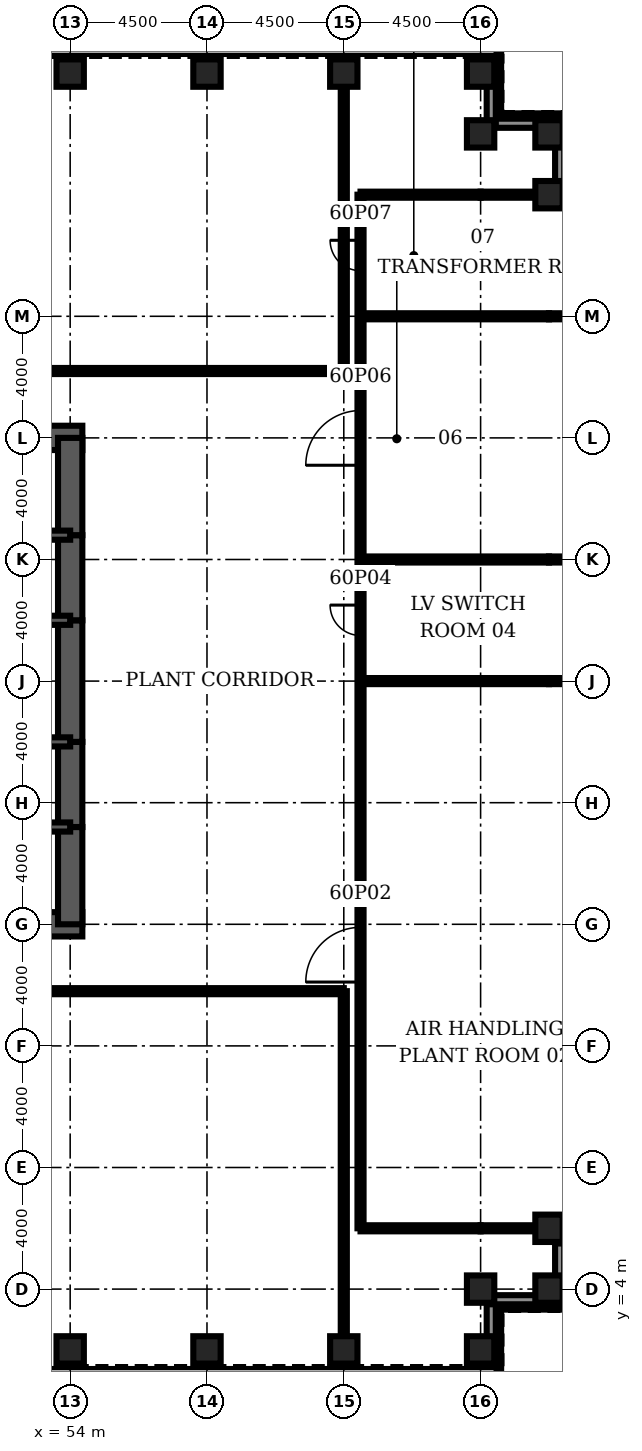
"""IFC4 building model, lengths in metres.
Left out: names, types, materials, properties, quantities, classifications, styles, units other than length and angle.
Written with IfcOpenShell. Run it as: python <this file> out.ifc"""

import sys

from ifc_helpers import new_model, si_unit, direction, frame, frame_2d, origin, origin_2d, place, context, subcontext, project, spatial, rectangle, hollow_rectangle, extrude, element, fill, save


model = new_model("IFC4")
c1 = context("Model", 3, precision=1e-05, world=origin(), true_north=direction((0.0, 1.0)))
c2 = subcontext(c1, "Body", "Model", "MODEL_VIEW")
j1 = project(units=[si_unit("LENGTHUNIT", "METRE"), si_unit("PLANEANGLEUNIT", "RADIAN")], contexts=[c1])
p1 = place(None, origin())
s1 = spatial("IfcSite", under=j1, at=p1, CompositionType="ELEMENT")
p2 = place(p1, origin())
s2 = spatial("IfcBuilding", under=s1, at=p2, CompositionType="ELEMENT")
p3 = place(p2, frame((0.0, 0.0, 265.6)))
s3 = spatial("IfcBuildingStorey", under=s2, at=p3, CompositionType="ELEMENT", Elevation=265.6)
for number, where, z_axis, x_axis in (
    (1, (54.0, 2.0, 0.0), (0.0, 0.0, 1.0), (0.0, 1.0, 0.0)),
    (2, (58.5, 2.0, 0.0), (0.0, 0.0, 1.0), (0.0, 1.0, 0.0)),
    (3, (63.0, 2.0, 0.0), (0.0, 0.0, 1.0), (0.0, 1.0, 0.0)),
):
    element("IfcColumn", number, at=place(p3, frame(where, z_axis=z_axis, x_axis=x_axis)), inside=s3, PredefinedType="COLUMN", context=c2, shape_type="SweptSolid", body=[
        extrude(hollow_rectangle(XDim=0.9, YDim=0.9, WallThickness=0.07, at=origin_2d()), origin(), (0.0, 0.0, 1.0), 5.5),
    ])
for number, where, z_axis, x_axis in (
    (4, (67.43, 2.0, 0.172), (-0.379, 0.0, 0.926), (0.0, -1.0, 0.0)),
    (5, (67.43, 4.0, 0.172), (-0.379, 0.0, 0.926), (0.0, -1.0, 0.0)),
    (6, (69.68, 4.0, 0.172), (-0.379, 0.0, 0.926), (0.926, 0.0, 0.379)),
    (7, (69.68, 6.0, 0.172), (-0.379, 0.0, 0.926), (0.926, 0.0, 0.379)),
    (8, (71.93, 6.0, 0.172), (-0.379, 0.0, 0.926), (0.926, 0.0, 0.379)),
    (9, (71.93, 8.0, 0.172), (-0.379, 0.0, 0.926), (0.926, 0.0, 0.379)),
    (10, (71.93, 12.0, 0.172), (-0.379, 0.0, 0.926), (0.926, 0.0, 0.379)),
    (11, (71.93, 16.0, 0.172), (-0.379, 0.0, 0.926), (0.926, 0.0, 0.379)),
    (12, (71.93, 20.0, 0.172), (-0.379, 0.0, 0.926), (0.926, 0.0, 0.379)),
    (13, (71.93, 24.0, 0.172), (-0.379, 0.0, 0.926), (0.926, 0.0, 0.379)),
    (14, (71.93, 28.0, 0.172), (-0.379, 0.0, 0.926), (0.926, 0.0, 0.379)),
    (15, (71.93, 32.0, 0.172), (-0.379, 0.0, 0.926), (0.926, 0.0, 0.379)),
    (16, (71.93, 36.0, 0.172), (-0.379, 0.0, 0.926), (0.926, 0.0, 0.379)),
    (17, (71.93, 40.0, 0.172), (-0.379, 0.0, 0.926), (0.926, 0.0, 0.379)),
    (18, (69.68, 40.0, 0.172), (-0.379, 0.0, 0.926), (0.926, 0.0, 0.379)),
    (19, (69.68, 42.0, 0.172), (-0.379, 0.0, 0.926), (0.926, 0.0, 0.379)),
    (20, (67.43, 42.0, 0.172), (-0.379, 0.0, 0.926), (0.0, -1.0, 0.0)),
    (21, (67.43, 44.0, 0.172), (-0.379, 0.0, 0.926), (0.0, -1.0, 0.0)),
):
    element("IfcColumn", number, at=place(p3, frame(where, z_axis=z_axis, x_axis=x_axis)), inside=s3, PredefinedType="USERDEFINED", context=c2, shape_type="SweptSolid", body=[
        extrude(hollow_rectangle(XDim=0.9, YDim=0.9, WallThickness=0.07, at=origin_2d()), origin(), (0.0, 0.0, 1.0), 5.57),
    ])
for number, where, z_axis, x_axis in (
    (22, (63.0, 44.0, 0.0), (0.0, 0.0, 1.0), (0.0, 1.0, 0.0)),
    (23, (58.5, 44.0, 0.0), (0.0, 0.0, 1.0), (0.0, 1.0, 0.0)),
    (24, (54.0, 44.0, 0.0), (0.0, 0.0, 1.0), (0.0, 1.0, 0.0)),
):
    element("IfcColumn", number, at=place(p3, frame(where, z_axis=z_axis, x_axis=x_axis)), inside=s3, PredefinedType="COLUMN", context=c2, shape_type="SweptSolid", body=[
        extrude(hollow_rectangle(XDim=0.9, YDim=0.9, WallThickness=0.07, at=origin_2d()), origin(), (0.0, 0.0, 1.0), 5.5),
    ])
for number, where, z_axis, x_axis in (
    (25, (45.0, 16.0, 0.0), (0.0, 0.0, 1.0), (1.0, 0.0, 0.0)),
    (26, (54.4, 32.0, 0.0), (0.0, 0.0, 1.0), (-1.0, 0.0, 0.0)),
):
    element("IfcWall", number, at=place(p3, frame(where, z_axis=z_axis, x_axis=x_axis)), inside=s3, PredefinedType="SHEAR", context=c2, shape_type="SweptSolid", body=[
        extrude(rectangle(XDim=9.4, YDim=0.8, at=frame_2d((4.7, 0.0))), origin(), (0.0, 0.0, 1.0), 5.5),
    ])
p4 = place(p3, frame((54.0, 16.0, 0.0), z_axis=(0.0, 0.0, 1.0), x_axis=(0.0, 1.0, 0.0)))
e27 = element("IfcWall", 27, at=p4, inside=s3, PredefinedType="SHEAR", context=c2, shape_type="SweptSolid", body=[
    extrude(rectangle(XDim=3.2, YDim=0.8, at=frame_2d((1.6, 0.0))), origin(), (0.0, 0.0, 1.0), 5.5),
])
p5 = place(p3, frame((54.0, 19.2, 0.0), z_axis=(0.0, 0.0, 1.0), x_axis=(0.0, 1.0, 0.0)))
e28 = element("IfcWall", 28, at=p5, inside=s3, PredefinedType="SHEAR", context=c2, shape_type="SweptSolid", body=[
    extrude(rectangle(XDim=2.8, YDim=0.8, at=frame_2d((1.4, 0.0))), origin(), (0.0, 0.0, 1.0), 5.5),
])
p6 = place(p5, frame((0.4, 0.0, 0.0)))
e29 = element("IfcOpeningElement", 29, at=p6, cuts=e28, PredefinedType="OPENING", context=c2, shape_type="SweptSolid", body=[
    extrude(rectangle(XDim=1.8, YDim=2.1, at=frame_2d((0.9, 1.05))), frame((0.0, 0.41, 0.0), z_axis=(0.0, -1.0, 0.0), x_axis=(1.0, 0.0, 0.0)), (0.0, 0.0, 1.0), 0.82),
])
p7 = place(p3, frame((54.0, 22.0, 0.0), z_axis=(0.0, 0.0, 1.0), x_axis=(0.0, 1.0, 0.0)))
e30 = element("IfcWall", 30, at=p7, inside=s3, PredefinedType="SHEAR", context=c2, shape_type="SweptSolid", body=[
    extrude(rectangle(XDim=4.0, YDim=0.8, at=frame_2d((2.0, 0.0))), origin(), (0.0, 0.0, 1.0), 5.5),
])
p8 = place(p3, frame((54.0, 26.0, 0.0), z_axis=(0.0, 0.0, 1.0), x_axis=(0.0, 1.0, 0.0)))
e31 = element("IfcWall", 31, at=p8, inside=s3, PredefinedType="SHEAR", context=c2, shape_type="SweptSolid", body=[
    extrude(rectangle(XDim=2.8, YDim=0.8, at=frame_2d((1.4, 0.0))), origin(), (0.0, 0.0, 1.0), 5.5),
])
p9 = place(p8, frame((0.6, 0.0, 0.0)))
e32 = element("IfcOpeningElement", 32, at=p9, cuts=e31, PredefinedType="OPENING", context=c2, shape_type="SweptSolid", body=[
    extrude(rectangle(XDim=1.8, YDim=2.1, at=frame_2d((0.9, 1.05))), frame((0.0, 0.41, 0.0), z_axis=(0.0, -1.0, 0.0), x_axis=(1.0, 0.0, 0.0)), (0.0, 0.0, 1.0), 0.82),
])
p10 = place(p3, frame((54.0, 28.8, 0.0), z_axis=(0.0, 0.0, 1.0), x_axis=(0.0, 1.0, 0.0)))
e33 = element("IfcWall", 33, at=p10, inside=s3, PredefinedType="SHEAR", context=c2, shape_type="SweptSolid", body=[
    extrude(rectangle(XDim=3.2, YDim=0.8, at=frame_2d((1.6, 0.0))), origin(), (0.0, 0.0, 1.0), 5.5),
])
p11 = place(p3, frame((45.0, 19.2, 0.0), z_axis=(0.0, 0.0, 1.0), x_axis=(1.0, 0.0, 0.0)))
e34 = element("IfcWall", 34, at=p11, inside=s3, PredefinedType="SOLIDWALL", context=c2, shape_type="SweptSolid", body=[
    extrude(rectangle(XDim=9.0, YDim=0.3, at=frame_2d((4.5, 0.0))), origin(), (0.0, 0.0, 1.0), 5.5),
])
p12 = place(p11, frame((7.35, 0.0, 0.0)))
e35 = element("IfcOpeningElement", 35, at=p12, cuts=e34, PredefinedType="OPENING", context=c2, shape_type="SweptSolid", body=[
    extrude(rectangle(XDim=1.0, YDim=2.1, at=frame_2d((0.5, 1.05))), frame((0.0, 0.16, 0.0), z_axis=(0.0, -1.0, 0.0), x_axis=(1.0, 0.0, 0.0)), (0.0, 0.0, 1.0), 0.32),
])
p13 = place(p3, frame((45.0, 28.8, 0.0), z_axis=(0.0, 0.0, 1.0), x_axis=(1.0, 0.0, 0.0)))
e36 = element("IfcWall", 36, at=p13, inside=s3, PredefinedType="SOLIDWALL", context=c2, shape_type="SweptSolid", body=[
    extrude(rectangle(XDim=9.0, YDim=0.3, at=frame_2d((4.5, 0.0))), origin(), (0.0, 0.0, 1.0), 5.5),
])
p14 = place(p13, frame((7.35, 0.0, 0.0)))
e37 = element("IfcOpeningElement", 37, at=p14, cuts=e36, PredefinedType="OPENING", context=c2, shape_type="SweptSolid", body=[
    extrude(rectangle(XDim=1.0, YDim=2.1, at=frame_2d((0.5, 1.05))), frame((0.0, 0.16, 0.0), z_axis=(0.0, -1.0, 0.0), x_axis=(1.0, 0.0, 0.0)), (0.0, 0.0, 1.0), 0.32),
])
p15 = place(p3, frame((48.0, 22.0, 0.0), z_axis=(0.0, 0.0, 1.0), x_axis=(1.0, 0.0, 0.0)))
e38 = element("IfcWall", 38, at=p15, inside=s3, PredefinedType="SOLIDWALL", context=c2, shape_type="SweptSolid", body=[
    extrude(rectangle(XDim=6.0, YDim=0.3, at=frame_2d((3.0, 0.0))), origin(), (0.0, 0.0, 1.0), 5.5),
])
p16 = place(p15, frame((2.0, 0.0, 0.0)))
e39 = element("IfcOpeningElement", 39, at=p16, cuts=e38, PredefinedType="OPENING", context=c2, shape_type="SweptSolid", body=[
    extrude(rectangle(XDim=1.0, YDim=2.1, at=frame_2d((0.5, 1.05))), frame((0.0, 0.16, 0.0), z_axis=(0.0, -1.0, 0.0), x_axis=(1.0, 0.0, 0.0)), (0.0, 0.0, 1.0), 0.32),
])
p17 = place(p3, frame((48.0, 26.0, 0.0), z_axis=(0.0, 0.0, 1.0), x_axis=(1.0, 0.0, 0.0)))
e40 = element("IfcWall", 40, at=p17, inside=s3, PredefinedType="SOLIDWALL", context=c2, shape_type="SweptSolid", body=[
    extrude(rectangle(XDim=6.0, YDim=0.3, at=frame_2d((3.0, 0.0))), origin(), (0.0, 0.0, 1.0), 5.5),
])
p18 = place(p3, frame((63.55, 6.0, 0.0), z_axis=(0.0, 0.0, 1.0), x_axis=(1.0, 0.0, 0.0)))
e41 = element("IfcWall", 41, at=p18, inside=s3, PredefinedType="PARTITIONING", context=c2, shape_type="SweptSolid", body=[
    extrude(rectangle(XDim=3.95, YDim=0.2, at=frame_2d((1.975, 0.0))), origin(), (0.0, 0.0, 1.0), 5.34),
])
p19 = place(p3, frame((67.5, 6.0, 0.0), z_axis=(0.0, 0.0, 1.0), x_axis=(1.0, 0.0, 0.0)))
e42 = element("IfcWall", 42, at=p19, inside=s3, PredefinedType="PARTITIONING", context=c2, shape_type="SweptSolid", body=[
    extrude(rectangle(XDim=1.8, YDim=0.2, at=frame_2d((0.9, 0.0))), origin(), (0.0, 0.0, 1.0), 4.64),
])
p20 = place(p3, frame((9.0, 13.8, 0.0), z_axis=(0.0, 0.0, 1.0), x_axis=(1.0, 0.0, 0.0)))
e43 = element("IfcWall", 43, at=p20, inside=s3, PredefinedType="PARTITIONING", context=c2, shape_type="SweptSolid", body=[
    extrude(rectangle(XDim=54.0, YDim=0.2, at=frame_2d((27.0, 0.0))), origin(), (0.0, 0.0, 1.0), 5.34),
])
p21 = place(p20, frame((26.1, 0.0, 0.0)))
e44 = element("IfcOpeningElement", 44, at=p21, cuts=e43, PredefinedType="OPENING", context=c2, shape_type="SweptSolid", body=[
    extrude(rectangle(XDim=1.8, YDim=2.1, at=frame_2d((0.9, 1.05))), frame((0.0, 0.11, 0.0), z_axis=(0.0, -1.0, 0.0), x_axis=(1.0, 0.0, 0.0)), (0.0, 0.0, 1.0), 0.22),
])
p22 = place(p3, frame((63.55, 24.0, 0.0), z_axis=(0.0, 0.0, 1.0), x_axis=(1.0, 0.0, 0.0)))
e45 = element("IfcWall", 45, at=p22, inside=s3, PredefinedType="PARTITIONING", context=c2, shape_type="SweptSolid", body=[
    extrude(rectangle(XDim=6.2, YDim=0.2, at=frame_2d((3.1, 0.0))), origin(), (0.0, 0.0, 1.0), 5.25),
])
p23 = place(p3, frame((69.75, 24.0, 0.0), z_axis=(0.0, 0.0, 1.0), x_axis=(1.0, 0.0, 0.0)))
e46 = element("IfcWall", 46, at=p23, inside=s3, PredefinedType="PARTITIONING", context=c2, shape_type="SweptSolid", body=[
    extrude(rectangle(XDim=1.8, YDim=0.2, at=frame_2d((0.9, 0.0))), origin(), (0.0, 0.0, 1.0), 4.726),
])
p24 = place(p3, frame((63.55, 28.0, 0.0), z_axis=(0.0, 0.0, 1.0), x_axis=(1.0, 0.0, 0.0)))
e47 = element("IfcWall", 47, at=p24, inside=s3, PredefinedType="PARTITIONING", context=c2, shape_type="SweptSolid", body=[
    extrude(rectangle(XDim=6.2, YDim=0.2, at=frame_2d((3.1, 0.0))), origin(), (0.0, 0.0, 1.0), 5.25),
])
p25 = place(p3, frame((69.75, 28.0, 0.0), z_axis=(0.0, 0.0, 1.0), x_axis=(1.0, 0.0, 0.0)))
e48 = element("IfcWall", 48, at=p25, inside=s3, PredefinedType="PARTITIONING", context=c2, shape_type="SweptSolid", body=[
    extrude(rectangle(XDim=1.8, YDim=0.2, at=frame_2d((0.9, 0.0))), origin(), (0.0, 0.0, 1.0), 4.726),
])
p26 = place(p3, frame((9.0, 34.2, 0.0), z_axis=(0.0, 0.0, 1.0), x_axis=(1.0, 0.0, 0.0)))
e49 = element("IfcWall", 49, at=p26, inside=s3, PredefinedType="PARTITIONING", context=c2, shape_type="SweptSolid", body=[
    extrude(rectangle(XDim=54.0, YDim=0.2, at=frame_2d((27.0, 0.0))), origin(), (0.0, 0.0, 1.0), 5.34),
])
p27 = place(p26, frame((26.1, 0.0, 0.0)))
e50 = element("IfcOpeningElement", 50, at=p27, cuts=e49, PredefinedType="OPENING", context=c2, shape_type="SweptSolid", body=[
    extrude(rectangle(XDim=1.8, YDim=2.1, at=frame_2d((0.9, 1.05))), frame((0.0, 0.11, 0.0), z_axis=(0.0, -1.0, 0.0), x_axis=(1.0, 0.0, 0.0)), (0.0, 0.0, 1.0), 0.22),
])
p28 = place(p3, frame((63.55, 36.0, 0.0), z_axis=(0.0, 0.0, 1.0), x_axis=(1.0, 0.0, 0.0)))
e51 = element("IfcWall", 51, at=p28, inside=s3, PredefinedType="PARTITIONING", context=c2, shape_type="SweptSolid", body=[
    extrude(rectangle(XDim=6.2, YDim=0.2, at=frame_2d((3.1, 0.0))), origin(), (0.0, 0.0, 1.0), 5.25),
])
p29 = place(p3, frame((69.75, 36.0, 0.0), z_axis=(0.0, 0.0, 1.0), x_axis=(1.0, 0.0, 0.0)))
e52 = element("IfcWall", 52, at=p29, inside=s3, PredefinedType="PARTITIONING", context=c2, shape_type="SweptSolid", body=[
    extrude(rectangle(XDim=1.8, YDim=0.2, at=frame_2d((0.9, 0.0))), origin(), (0.0, 0.0, 1.0), 4.726),
])
p30 = place(p3, frame((63.55, 40.0, 0.0), z_axis=(0.0, 0.0, 1.0), x_axis=(1.0, 0.0, 0.0)))
e53 = element("IfcWall", 53, at=p30, inside=s3, PredefinedType="PARTITIONING", context=c2, shape_type="SweptSolid", body=[
    extrude(rectangle(XDim=3.95, YDim=0.2, at=frame_2d((1.975, 0.0))), origin(), (0.0, 0.0, 1.0), 5.34),
])
p31 = place(p3, frame((67.5, 40.0, 0.0), z_axis=(0.0, 0.0, 1.0), x_axis=(1.0, 0.0, 0.0)))
e54 = element("IfcWall", 54, at=p31, inside=s3, PredefinedType="PARTITIONING", context=c2, shape_type="SweptSolid", body=[
    extrude(rectangle(XDim=1.8, YDim=0.2, at=frame_2d((0.9, 0.0))), origin(), (0.0, 0.0, 1.0), 4.64),
])
p32 = place(p3, frame((63.0, 2.45, 0.0), z_axis=(0.0, 0.0, 1.0), x_axis=(0.0, 1.0, 0.0)))
e55 = element("IfcWall", 55, at=p32, inside=s3, PredefinedType="PARTITIONING", context=c2, shape_type="SweptSolid", body=[
    extrude(rectangle(XDim=11.35, YDim=0.2, at=frame_2d((5.675, 0.0))), origin(), (0.0, 0.0, 1.0), 5.34),
])
p33 = place(p3, frame((63.0, 34.2, 0.0), z_axis=(0.0, 0.0, 1.0), x_axis=(0.0, 1.0, 0.0)))
e56 = element("IfcWall", 56, at=p33, inside=s3, PredefinedType="PARTITIONING", context=c2, shape_type="SweptSolid", body=[
    extrude(rectangle(XDim=9.35, YDim=0.2, at=frame_2d((4.675, 0.0))), origin(), (0.0, 0.0, 1.0), 5.34),
])
p34 = place(p3, frame((63.55, 6.0, 0.0), z_axis=(0.0, 0.0, 1.0), x_axis=(0.0, 1.0, 0.0)))
e57 = element("IfcWall", 57, at=p34, inside=s3, PredefinedType="PARTITIONING", context=c2, shape_type="SweptSolid", body=[
    extrude(rectangle(XDim=34.0, YDim=0.2, at=frame_2d((17.0, 0.0))), origin(), (0.0, 0.0, 1.0), 5.34),
])
p35 = place(p34, frame((8.1, 0.0, 0.0)))
e58 = element("IfcOpeningElement", 58, at=p35, cuts=e57, PredefinedType="OPENING", context=c2, shape_type="SweptSolid", body=[
    extrude(rectangle(XDim=1.8, YDim=2.1, at=frame_2d((0.9, 1.05))), frame((0.0, 0.11, 0.0), z_axis=(0.0, -1.0, 0.0), x_axis=(1.0, 0.0, 0.0)), (0.0, 0.0, 1.0), 0.22),
])
p36 = place(p34, frame((19.5, 0.0, 0.0)))
e59 = element("IfcOpeningElement", 59, at=p36, cuts=e57, PredefinedType="OPENING", context=c2, shape_type="SweptSolid", body=[
    extrude(rectangle(XDim=1.0, YDim=2.1, at=frame_2d((0.5, 1.05))), frame((0.0, 0.11, 0.0), z_axis=(0.0, -1.0, 0.0), x_axis=(1.0, 0.0, 0.0)), (0.0, 0.0, 1.0), 0.22),
])
p37 = place(p34, frame((25.1, 0.0, 0.0)))
e60 = element("IfcOpeningElement", 60, at=p37, cuts=e57, PredefinedType="OPENING", context=c2, shape_type="SweptSolid", body=[
    extrude(rectangle(XDim=1.8, YDim=2.1, at=frame_2d((0.9, 1.05))), frame((0.0, 0.11, 0.0), z_axis=(0.0, -1.0, 0.0), x_axis=(1.0, 0.0, 0.0)), (0.0, 0.0, 1.0), 0.22),
])
p38 = place(p34, frame((31.5, 0.0, 0.0)))
e61 = element("IfcOpeningElement", 61, at=p38, cuts=e57, PredefinedType="OPENING", context=c2, shape_type="SweptSolid", body=[
    extrude(rectangle(XDim=1.0, YDim=2.1, at=frame_2d((0.5, 1.05))), frame((0.0, 0.11, 0.0), z_axis=(0.0, -1.0, 0.0), x_axis=(1.0, 0.0, 0.0)), (0.0, 0.0, 1.0), 0.22),
])
p39 = place(p3, frame((68.1, 1.4, 0.0), z_axis=(0.0, 0.0, 1.0), x_axis=(0.0, 1.0, 0.0)))
e62 = element("IfcWall", 62, at=p39, inside=s3, PredefinedType="ELEMENTEDWALL", context=c2, shape_type="SweptSolid", body=[
    extrude(rectangle(XDim=2.0, YDim=0.15, at=frame_2d((1.0, 0.0))), origin(), (0.0, 0.0, 1.0), 5.34),
])
for number, where, z_axis, x_axis in (
    (63, (68.1, 3.4, 0.0), (0.0, 0.0, 1.0), (1.0, 0.0, 0.0)),
    (64, (70.35, 42.6, 0.0), (0.0, 0.0, 1.0), (-1.0, 0.0, 0.0)),
):
    element("IfcWall", number, at=place(p3, frame(where, z_axis=z_axis, x_axis=x_axis)), inside=s3, PredefinedType="ELEMENTEDWALL", context=c2, shape_type="SweptSolid", body=[
        extrude(rectangle(XDim=2.25, YDim=0.15, at=frame_2d((1.125, 0.0))), origin(), (0.0, 0.0, 1.0), 5.34),
    ])
p40 = place(p3, frame((68.1, 42.6, 0.0), z_axis=(0.0, 0.0, 1.0), x_axis=(0.0, 1.0, 0.0)))
e65 = element("IfcWall", 65, at=p40, inside=s3, PredefinedType="ELEMENTEDWALL", context=c2, shape_type="SweptSolid", body=[
    extrude(rectangle(XDim=2.0, YDim=0.15, at=frame_2d((1.0, 0.0))), origin(), (0.0, 0.0, 1.0), 5.34),
])
p41 = place(p3, frame((67.85, 1.65, 5.5), z_axis=(0.0, 0.0, 1.0), x_axis=(0.0, 1.0, 0.0)))
e66 = element("IfcWall", 66, at=p41, inside=s3, PredefinedType="PARAPET", context=c2, shape_type="SweptSolid", body=[
    extrude(rectangle(XDim=2.0, YDim=0.3, at=frame_2d((1.0, 0.0))), origin(), (0.0, 0.0, 1.0), 1.1),
])
p42 = place(p3, frame((67.85, 3.65, 5.5), z_axis=(0.0, 0.0, 1.0), x_axis=(1.0, 0.0, 0.0)))
e67 = element("IfcWall", 67, at=p42, inside=s3, PredefinedType="PARAPET", context=c2, shape_type="SweptSolid", body=[
    extrude(rectangle(XDim=2.25, YDim=0.3, at=frame_2d((1.125, 0.0))), origin(), (0.0, 0.0, 1.0), 1.1),
])
p43 = place(p3, frame((70.1, 3.65, 5.5), z_axis=(0.0, 0.0, 1.0), x_axis=(0.0, 1.0, 0.0)))
e68 = element("IfcWall", 68, at=p43, inside=s3, PredefinedType="PARAPET", context=c2, shape_type="SweptSolid", body=[
    extrude(rectangle(XDim=2.0, YDim=0.3, at=frame_2d((1.0, 0.0))), origin(), (0.0, 0.0, 1.0), 1.1),
])
for number, where, z_axis, x_axis in (
    (69, (70.1, 5.65, 5.5), (0.0, 0.0, 1.0), (1.0, 0.0, 0.0)),
    (70, (72.35, 40.35, 5.5), (0.0, 0.0, 1.0), (-1.0, 0.0, 0.0)),
):
    element("IfcWall", number, at=place(p3, frame(where, z_axis=z_axis, x_axis=x_axis)), inside=s3, PredefinedType="PARAPET", context=c2, shape_type="SweptSolid", body=[
        extrude(rectangle(XDim=2.25, YDim=0.3, at=frame_2d((1.125, 0.0))), origin(), (0.0, 0.0, 1.0), 1.1),
    ])
p44 = place(p3, frame((70.1, 40.35, 5.5), z_axis=(0.0, 0.0, 1.0), x_axis=(0.0, 1.0, 0.0)))
e71 = element("IfcWall", 71, at=p44, inside=s3, PredefinedType="PARAPET", context=c2, shape_type="SweptSolid", body=[
    extrude(rectangle(XDim=2.0, YDim=0.3, at=frame_2d((1.0, 0.0))), origin(), (0.0, 0.0, 1.0), 1.1),
])
p45 = place(p3, frame((70.1, 42.35, 5.5), z_axis=(0.0, 0.0, 1.0), x_axis=(-1.0, 0.0, 0.0)))
e72 = element("IfcWall", 72, at=p45, inside=s3, PredefinedType="PARAPET", context=c2, shape_type="SweptSolid", body=[
    extrude(rectangle(XDim=2.25, YDim=0.3, at=frame_2d((1.125, 0.0))), origin(), (0.0, 0.0, 1.0), 1.1),
])
p46 = place(p3, frame((67.85, 42.35, 5.5), z_axis=(0.0, 0.0, 1.0), x_axis=(0.0, 1.0, 0.0)))
e73 = element("IfcWall", 73, at=p46, inside=s3, PredefinedType="PARAPET", context=c2, shape_type="SweptSolid", body=[
    extrude(rectangle(XDim=2.0, YDim=0.3, at=frame_2d((1.0, 0.0))), origin(), (0.0, 0.0, 1.0), 1.1),
])
p47 = place(p35, origin())
e74 = element("IfcDoor", 74, at=p47, inside=s3, OperationType="SINGLE_SWING_LEFT", PredefinedType="DOOR", context=c2, shape_type="SweptSolid", body=[
    extrude(rectangle(XDim=1.8, YDim=2.1, at=frame_2d((0.9, 1.05))), frame((0.0, 0.025, 0.0), z_axis=(0.0, -1.0, 0.0), x_axis=(1.0, 0.0, 0.0)), (0.0, 0.0, 1.0), 0.05),
])
fill(e58, e74)
p48 = place(p36, origin())
e75 = element("IfcDoor", 75, at=p48, inside=s3, OperationType="SINGLE_SWING_RIGHT", PredefinedType="DOOR", context=c2, shape_type="SweptSolid", body=[
    extrude(rectangle(XDim=1.0, YDim=2.1, at=frame_2d((0.5, 1.05))), frame((0.0, 0.025, 0.0), z_axis=(0.0, -1.0, 0.0), x_axis=(1.0, 0.0, 0.0)), (0.0, 0.0, 1.0), 0.05),
])
fill(e59, e75)
p49 = place(p37, origin())
e76 = element("IfcDoor", 76, at=p49, inside=s3, OperationType="SINGLE_SWING_LEFT", PredefinedType="DOOR", context=c2, shape_type="SweptSolid", body=[
    extrude(rectangle(XDim=1.8, YDim=2.1, at=frame_2d((0.9, 1.05))), frame((0.0, 0.025, 0.0), z_axis=(0.0, -1.0, 0.0), x_axis=(1.0, 0.0, 0.0)), (0.0, 0.0, 1.0), 0.05),
])
fill(e60, e76)
p50 = place(p38, origin())
e77 = element("IfcDoor", 77, at=p50, inside=s3, OperationType="SINGLE_SWING_RIGHT", PredefinedType="DOOR", context=c2, shape_type="SweptSolid", body=[
    extrude(rectangle(XDim=1.0, YDim=2.1, at=frame_2d((0.5, 1.05))), frame((0.0, 0.025, 0.0), z_axis=(0.0, -1.0, 0.0), x_axis=(1.0, 0.0, 0.0)), (0.0, 0.0, 1.0), 0.05),
])
fill(e61, e77)
p51 = place(p6, origin())
e78 = element("IfcDoor", 78, at=p51, inside=s3, OperationType="SINGLE_SWING_LEFT", PredefinedType="DOOR", context=c2, shape_type="SweptSolid", body=[
    extrude(rectangle(XDim=1.8, YDim=2.1, at=frame_2d((0.9, 1.05))), frame((0.0, 0.4, 0.0), z_axis=(0.0, -1.0, 0.0), x_axis=(1.0, 0.0, 0.0)), (0.0, 0.0, 1.0), 0.8),
])
fill(e29, e78)
p52 = place(p9, origin())
e79 = element("IfcDoor", 79, at=p52, inside=s3, OperationType="SINGLE_SWING_LEFT", PredefinedType="DOOR", context=c2, shape_type="SweptSolid", body=[
    extrude(rectangle(XDim=1.8, YDim=2.1, at=frame_2d((0.9, 1.05))), frame((0.0, 0.4, 0.0), z_axis=(0.0, -1.0, 0.0), x_axis=(1.0, 0.0, 0.0)), (0.0, 0.0, 1.0), 0.8),
])
fill(e32, e79)
save(model, sys.argv[1])
